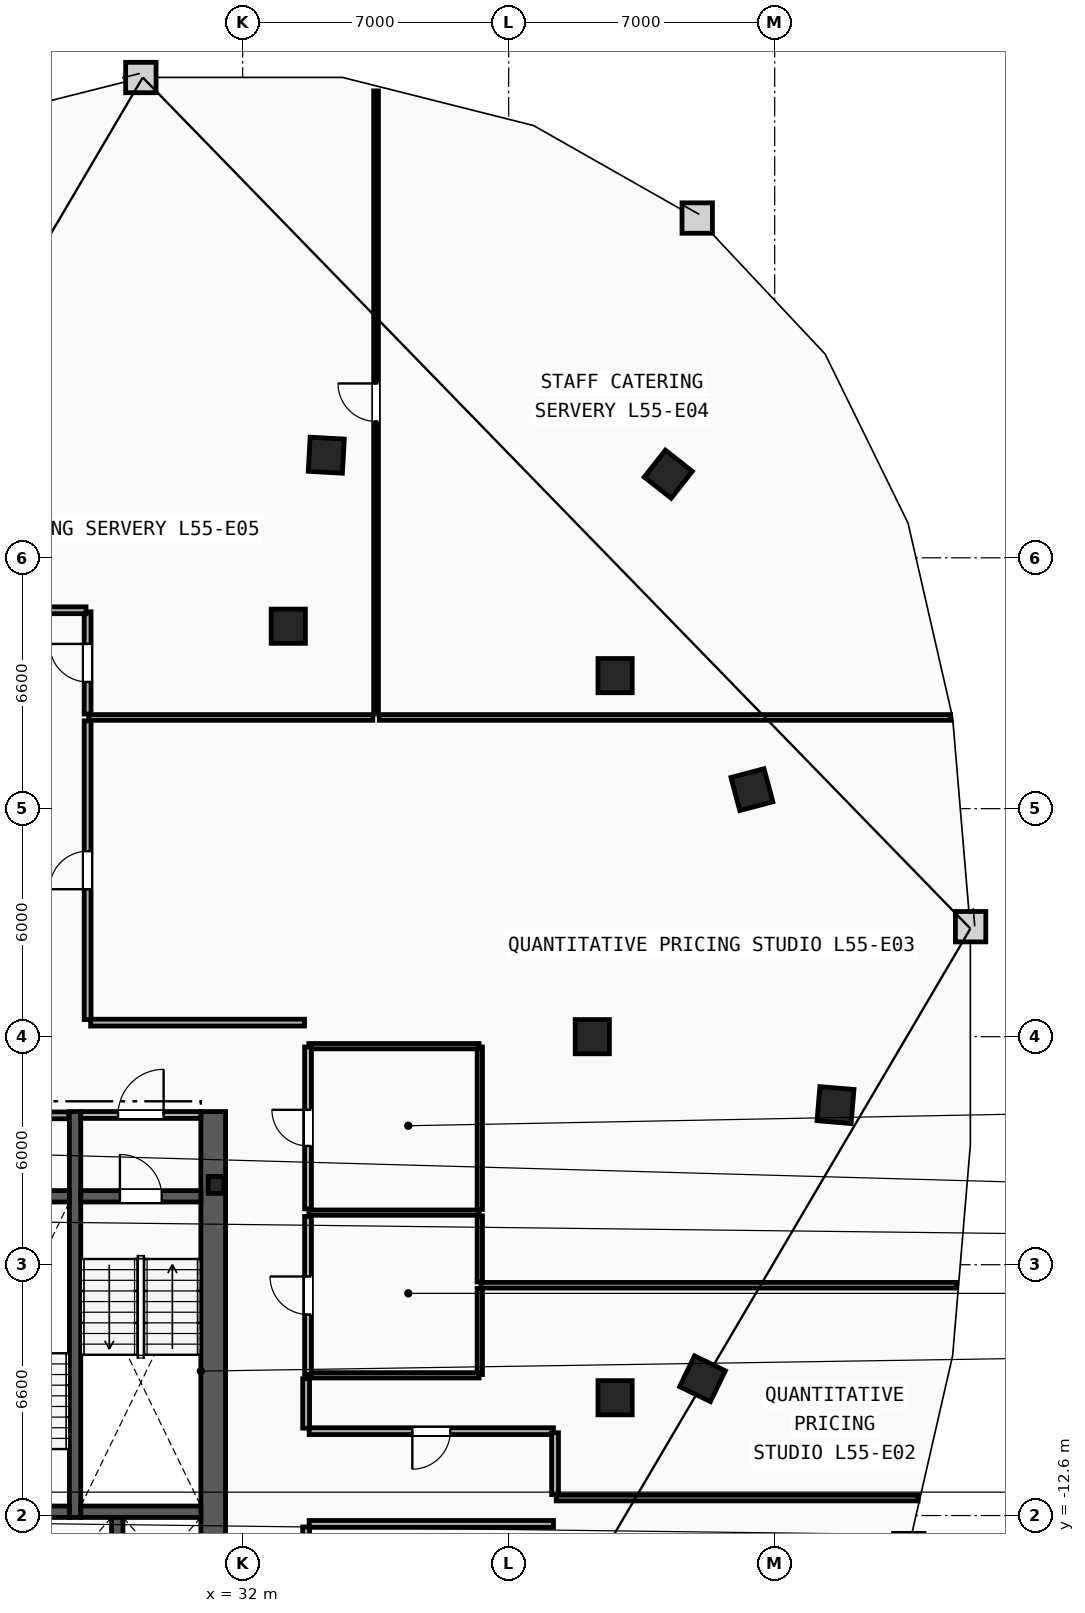
"""IFC4 building model, lengths in metres.
Left out: names, types, materials, properties, quantities, classifications, styles, units other than length and angle.
Written with IfcOpenShell. Run it as: python <this file> out.ifc"""

import sys

from ifc_helpers import new_model, si_unit, direction, frame, frame_2d, origin, origin_2d, place, context, subcontext, project, spatial, rectangle, i_section, extrude, element, fill, save


model = new_model("IFC4")
c1 = context("Model", 3, precision=1e-05, world=origin(), true_north=direction((0.0, 1.0)))
c2 = subcontext(c1, "Body", "Model", "MODEL_VIEW")
j1 = project(units=[si_unit("LENGTHUNIT", "METRE"), si_unit("PLANEANGLEUNIT", "RADIAN")], contexts=[c1])
p1 = place(None, origin())
s1 = spatial("IfcSite", under=j1, at=p1, CompositionType="ELEMENT")
p2 = place(p1, origin())
s2 = spatial("IfcBuilding", under=s1, at=p2, CompositionType="ELEMENT")
p3 = place(p2, frame((0.0, 0.0, 209.8)))
s3 = spatial("IfcBuildingStorey", under=s2, at=p3, CompositionType="ELEMENT", Elevation=209.8)
p4 = place(p3, frame((31.3, -3.9, 0.0), z_axis=(0.0, 0.0, 1.0), x_axis=(1.0, 0.0, 0.0)))
e1 = element("IfcColumn", 1, at=p4, inside=s3, PredefinedType="COLUMN", context=c2, shape_type="SweptSolid", body=[
    extrude(i_section(OverallWidth=0.416, OverallDepth=0.446, WebThickness=0.039, FlangeThickness=0.063, FilletRadius=0.018, at=origin_2d()), origin(), (0.0, 0.0, 1.0), 3.6),
])
for number, where, z_axis, x_axis in (
    (2, (41.2, 0.0, 0.0), (0.0, 0.0, 1.0), (1.0, 0.0, 0.0)),
    (3, (41.8, -9.5, 0.0), (0.0, 0.0, 1.0), (1.0, 0.0, 0.0)),
    (4, (41.8, 9.5, 0.0), (0.0, 0.0, 1.0), (1.0, 0.0, 0.0)),
    (5, (33.2, 10.8, 0.0), (0.0, 0.0, 1.0), (1.0, 0.0, 0.0)),
    (6, (44.1, -9.0, 0.0), (0.0, 0.0, 1.0), (0.437, 0.899, 0.0)),
    (7, (47.6, -1.8, 0.0), (0.0, 0.0, 1.0), (0.084, 0.997, 0.0)),
    (8, (45.4, 6.5, 0.0), (0.0, 0.0, 1.0), (-0.256, 0.967, 0.0)),
    (9, (43.2, 14.8, 0.0), (0.0, 0.0, 1.0), (-0.786, 0.618, 0.0)),
    (10, (34.2, 15.3, 0.0), (0.0, 0.0, 1.0), (-0.998, 0.055, 0.0)),
):
    element("IfcColumn", number, at=place(p3, frame(where, z_axis=z_axis, x_axis=x_axis)), inside=s3, PredefinedType="COLUMN", context=c2, shape_type="SweptSolid", body=[
        extrude(rectangle(XDim=0.9, YDim=0.9, at=origin_2d()), origin(), (0.0, 0.0, 1.0), 3.6),
    ])
p5 = place(p3, frame((31.225, -15.3, 0.0), z_axis=(0.0, 0.0, 1.0), x_axis=(0.0, 1.0, 0.0)))
e11 = element("IfcWall", 11, at=p5, inside=s3, PredefinedType="SHEAR", context=c2, shape_type="SweptSolid", body=[
    extrude(rectangle(XDim=13.33, YDim=0.65, at=frame_2d((6.665, 0.0))), origin(), (0.0, 0.0, 1.0), 3.34),
])
p6 = place(p3, frame((27.59, -12.65, 0.0), z_axis=(0.0, 0.0, 1.0), x_axis=(0.0, 1.0, 0.0)))
e12 = element("IfcWall", 12, at=p6, inside=s3, PredefinedType="SHEAR", context=c2, shape_type="SweptSolid", body=[
    extrude(rectangle(XDim=10.68, YDim=0.3, at=frame_2d((5.34, 0.0))), origin(), (0.0, 0.0, 1.0), 3.34),
])
p7 = place(p3, frame((27.74, -4.2, 0.0), z_axis=(0.0, 0.0, 1.0), x_axis=(1.0, 0.0, 0.0)))
e13 = element("IfcWall", 13, at=p7, inside=s3, PredefinedType="SHEAR", context=c2, shape_type="SweptSolid", body=[
    extrude(rectangle(XDim=3.16, YDim=0.3, at=frame_2d((1.58, 0.0))), origin(), (0.0, 0.0, 1.0), 3.34),
])
p8 = place(p7, frame((1.03, 0.0, 0.0)))
e14 = element("IfcOpeningElement", 14, at=p8, cuts=e13, PredefinedType="OPENING", context=c2, shape_type="SweptSolid", body=[
    extrude(rectangle(XDim=1.1, YDim=2.15, at=frame_2d((0.55, 1.075))), frame((0.0, 0.16, 0.0), z_axis=(0.0, -1.0, 0.0), x_axis=(1.0, 0.0, 0.0)), (0.0, 0.0, 1.0), 0.32),
])
p9 = place(p3, frame((27.74, -12.5, 0.0), z_axis=(0.0, 0.0, 1.0), x_axis=(1.0, 0.0, 0.0)))
e15 = element("IfcWall", 15, at=p9, inside=s3, PredefinedType="SHEAR", context=c2, shape_type="SweptSolid", body=[
    extrude(rectangle(XDim=3.16, YDim=0.3, at=frame_2d((1.58, 0.0))), origin(), (0.0, 0.0, 1.0), 3.34),
])
p10 = place(p3, frame((24.28, -12.5, 0.0), z_axis=(0.0, 0.0, 1.0), x_axis=(1.0, 0.0, 0.0)))
e16 = element("IfcWall", 16, at=p10, inside=s3, PredefinedType="SHEAR", context=c2, shape_type="SweptSolid", body=[
    extrude(rectangle(XDim=3.16, YDim=0.3, at=frame_2d((1.58, 0.0))), origin(), (0.0, 0.0, 1.0), 3.34),
])
p11 = place(p10, frame((1.03, 0.0, 0.0)))
e17 = element("IfcOpeningElement", 17, at=p11, cuts=e16, PredefinedType="OPENING", context=c2, shape_type="SweptSolid", body=[
    extrude(rectangle(XDim=1.1, YDim=2.15, at=frame_2d((0.55, 1.075))), frame((0.0, 0.16, 0.0), z_axis=(0.0, -1.0, 0.0), x_axis=(1.0, 0.0, 0.0)), (0.0, 0.0, 1.0), 0.32),
])
p12 = place(p3, frame((24.28, -4.2, 0.0), z_axis=(0.0, 0.0, 1.0), x_axis=(1.0, 0.0, 0.0)))
e18 = element("IfcWall", 18, at=p12, inside=s3, PredefinedType="SHEAR", context=c2, shape_type="SweptSolid", body=[
    extrude(rectangle(XDim=3.16, YDim=0.3, at=frame_2d((1.58, 0.0))), origin(), (0.0, 0.0, 1.0), 3.34),
])
p13 = place(p3, frame((27.74, -2.06, 0.0), z_axis=(0.0, 0.0, 1.0), x_axis=(1.0, 0.0, 0.0)))
e19 = element("IfcWall", 19, at=p13, inside=s3, PredefinedType="PARTITIONING", context=c2, shape_type="SweptSolid", body=[
    extrude(rectangle(XDim=3.16, YDim=0.18, at=frame_2d((1.58, 0.0))), origin(), (0.0, 0.0, 1.0), 3.34),
])
p14 = place(p13, frame((0.98, 0.0, 0.0)))
e20 = element("IfcOpeningElement", 20, at=p14, cuts=e19, PredefinedType="OPENING", context=c2, shape_type="SweptSolid", body=[
    extrude(rectangle(XDim=1.2, YDim=2.15, at=frame_2d((0.6, 1.075))), frame((0.0, 0.1, 0.0), z_axis=(0.0, -1.0, 0.0), x_axis=(1.0, 0.0, 0.0)), (0.0, 0.0, 1.0), 0.2),
])
p15 = place(p3, frame((28.7, -14.95, 0.0), z_axis=(0.0, 0.0, 1.0), x_axis=(0.0, 1.0, 0.0)))
e21 = element("IfcWall", 21, at=p15, inside=s3, PredefinedType="SHEAR", context=c2, shape_type="SweptSolid", body=[
    extrude(rectangle(XDim=2.3, YDim=0.3, at=frame_2d((1.15, 0.0))), origin(), (0.0, 0.0, 1.0), 3.34),
])
p16 = place(p3, frame((24.3, -2.07, 0.0), z_axis=(0.0, 0.0, 1.0), x_axis=(1.0, 0.0, 0.0)))
e22 = element("IfcWall", 22, at=p16, inside=s3, PredefinedType="PARTITIONING", context=c2, shape_type="SweptSolid", body=[
    extrude(rectangle(XDim=3.12, YDim=0.18, at=frame_2d((1.56, 0.0))), origin(), (0.0, 0.0, 1.0), 3.34),
])
p17 = place(p16, frame((1.085, 0.0, 0.0)))
e23 = element("IfcOpeningElement", 23, at=p17, cuts=e22, PredefinedType="OPENING", context=c2, shape_type="SweptSolid", body=[
    extrude(rectangle(XDim=0.95, YDim=2.1, at=frame_2d((0.475, 1.05))), frame((0.0, 0.1, 0.0), z_axis=(0.0, -1.0, 0.0), x_axis=(1.0, 0.0, 0.0)), (0.0, 0.0, 1.0), 0.2),
])
p18 = place(p3, frame((38.24, -8.89, 0.0), z_axis=(0.0, 0.0, 1.0), x_axis=(0.0, 1.0, 0.0)))
e24 = element("IfcWall", 24, at=p18, inside=s3, PredefinedType="PARTITIONING", context=c2, shape_type="SweptSolid", body=[
    extrude(rectangle(XDim=2.265, YDim=0.14, at=frame_2d((1.132, 0.0))), origin(), (0.0, 0.0, 1.0), 3.34),
])
p19 = place(p3, frame((38.24, -6.455, 0.0), z_axis=(0.0, 0.0, 1.0), x_axis=(0.0, 1.0, 0.0)))
e25 = element("IfcWall", 25, at=p19, inside=s3, PredefinedType="PARTITIONING", context=c2, shape_type="SweptSolid", body=[
    extrude(rectangle(XDim=1.74, YDim=0.14, at=frame_2d((0.87, 0.0))), origin(), (0.0, 0.0, 1.0), 3.34),
])
p20 = place(p3, frame((38.24, -4.545, 0.0), z_axis=(0.0, 0.0, 1.0), x_axis=(0.0, 1.0, 0.0)))
e26 = element("IfcWall", 26, at=p20, inside=s3, PredefinedType="PARTITIONING", context=c2, shape_type="SweptSolid", body=[
    extrude(rectangle(XDim=4.275, YDim=0.14, at=frame_2d((2.137, 0.0))), origin(), (0.0, 0.0, 1.0), 3.34),
])
for number, where, z_axis, x_axis in (
    (27, (33.74, -0.25, 0.0), (0.0, 0.0, 1.0), (1.0, 0.0, 0.0)),
    (28, (33.74, -4.63, 0.0), (0.0, 0.0, 1.0), (1.0, 0.0, 0.0)),
    (29, (33.74, -8.91, 0.0), (0.0, 0.0, 1.0), (1.0, 0.0, 0.0)),
):
    element("IfcWall", number, at=place(p3, frame(where, z_axis=z_axis, x_axis=x_axis)), inside=s3, PredefinedType="PARTITIONING", context=c2, shape_type="SweptSolid", body=[
        extrude(rectangle(XDim=4.48, YDim=0.14, at=frame_2d((2.24, 0.0))), origin(), (0.0, 0.0, 1.0), 3.34),
    ])
p21 = place(p3, frame((33.72, -4.53, 0.0), z_axis=(0.0, 0.0, 1.0), x_axis=(0.0, 1.0, 0.0)))
e30 = element("IfcWall", 30, at=p21, inside=s3, PredefinedType="PARTITIONING", context=c2, shape_type="SweptSolid", body=[
    extrude(rectangle(XDim=4.26, YDim=0.18, at=frame_2d((2.13, 0.0))), origin(), (0.0, 0.0, 1.0), 3.34),
])
p22 = place(p21, frame((1.655, 0.0, 0.0)))
e31 = element("IfcOpeningElement", 31, at=p22, cuts=e30, PredefinedType="OPENING", context=c2, shape_type="SweptSolid", body=[
    extrude(rectangle(XDim=0.95, YDim=2.1, at=frame_2d((0.475, 1.05))), frame((0.0, 0.1, 0.0), z_axis=(0.0, -1.0, 0.0), x_axis=(1.0, 0.0, 0.0)), (0.0, 0.0, 1.0), 0.2),
])
p23 = place(p3, frame((33.72, -8.89, 0.0), z_axis=(0.0, 0.0, 1.0), x_axis=(0.0, 1.0, 0.0)))
e32 = element("IfcWall", 32, at=p23, inside=s3, PredefinedType="PARTITIONING", context=c2, shape_type="SweptSolid", body=[
    extrude(rectangle(XDim=4.16, YDim=0.18, at=frame_2d((2.08, 0.0))), origin(), (0.0, 0.0, 1.0), 3.34),
])
p24 = place(p23, frame((1.58, 0.0, 0.0)))
e33 = element("IfcOpeningElement", 33, at=p24, cuts=e32, PredefinedType="OPENING", context=c2, shape_type="SweptSolid", body=[
    extrude(rectangle(XDim=1.0, YDim=2.15, at=frame_2d((0.5, 1.075))), frame((0.0, 0.1, 0.0), z_axis=(0.0, -1.0, 0.0), x_axis=(1.0, 0.0, 0.0)), (0.0, 0.0, 1.0), 0.2),
])
p25 = place(p3, frame((27.95, 8.4, 0.0), z_axis=(0.0, 0.0, 1.0), x_axis=(1.0, 0.0, 0.0)))
e34 = element("IfcWall", 34, at=p25, inside=s3, PredefinedType="PARTITIONING", context=c2, shape_type="SweptSolid", body=[
    extrude(rectangle(XDim=7.475, YDim=0.15, at=frame_2d((3.738, 0.0))), origin(), (0.0, 0.0, 1.0), 3.34),
])
p26 = place(p3, frame((35.595, 8.4, 0.0), z_axis=(0.0, 0.0, 1.0), x_axis=(1.0, 0.0, 0.0)))
e35 = element("IfcWall", 35, at=p26, inside=s3, PredefinedType="PARTITIONING", context=c2, shape_type="SweptSolid", body=[
    extrude(rectangle(XDim=15.035, YDim=0.15, at=frame_2d((7.517, 0.0))), origin(), (0.0, 0.0, 1.0), 3.34),
])
p27 = place(p3, frame((38.27, -6.54, 0.0), z_axis=(0.0, 0.0, 1.0), x_axis=(1.0, 0.0, 0.0)))
e36 = element("IfcWall", 36, at=p27, inside=s3, PredefinedType="PARTITIONING", context=c2, shape_type="SweptSolid", body=[
    extrude(rectangle(XDim=12.518, YDim=0.15, at=frame_2d((6.259, 0.0))), origin(), (0.0, 0.0, 1.0), 3.34),
])
p28 = place(p3, frame((40.25, -12.14, 0.0), z_axis=(0.0, 0.0, 1.0), x_axis=(1.0, 0.0, 0.0)))
e37 = element("IfcWall", 37, at=p28, inside=s3, PredefinedType="PARTITIONING", context=c2, shape_type="SweptSolid", body=[
    extrude(rectangle(XDim=9.523, YDim=0.15, at=frame_2d((4.761, 0.0))), origin(), (0.0, 0.0, 1.0), 3.34),
])
p29 = place(p3, frame((33.75, -12.82, 0.0), z_axis=(0.0, 0.0, 1.0), x_axis=(1.0, 0.0, 0.0)))
e38 = element("IfcWall", 38, at=p29, inside=s3, PredefinedType="PARTITIONING", context=c2, shape_type="SweptSolid", body=[
    extrude(rectangle(XDim=6.428, YDim=0.18, at=frame_2d((3.214, 0.0))), origin(), (0.0, 0.0, 1.0), 3.34),
])
p30 = place(p3, frame((33.67, -17.428, 0.0), z_axis=(0.0, 0.0, 1.0), x_axis=(0.0, 1.0, 0.0)))
e39 = element("IfcWall", 39, at=p30, inside=s3, PredefinedType="PARTITIONING", context=c2, shape_type="SweptSolid", body=[
    extrude(rectangle(XDim=4.529, YDim=0.18, at=frame_2d((2.264, 0.0))), origin(), (0.0, 0.0, 1.0), 3.34),
])
p31 = place(p3, frame((40.178, -10.38, 0.0), z_axis=(0.0, 0.0, 1.0), x_axis=(-1.0, 0.0, 0.0)))
e40 = element("IfcWall", 40, at=p31, inside=s3, PredefinedType="PARTITIONING", context=c2, shape_type="SweptSolid", body=[
    extrude(rectangle(XDim=6.428, YDim=0.18, at=frame_2d((3.214, 0.0))), origin(), (0.0, 0.0, 1.0), 3.34),
])
p32 = place(p31, frame((2.714, 0.0, 0.0)))
e41 = element("IfcOpeningElement", 41, at=p32, cuts=e40, PredefinedType="OPENING", context=c2, shape_type="SweptSolid", body=[
    extrude(rectangle(XDim=1.0, YDim=2.15, at=frame_2d((0.5, 1.075))), frame((0.0, 0.1, 0.0), z_axis=(0.0, -1.0, 0.0), x_axis=(1.0, 0.0, 0.0)), (0.0, 0.0, 1.0), 0.2),
])
p33 = place(p3, frame((40.22, -12.05, 0.0), z_axis=(0.0, 0.0, 1.0), x_axis=(0.0, 1.0, 0.0)))
e42 = element("IfcWall", 42, at=p33, inside=s3, PredefinedType="PARTITIONING", context=c2, shape_type="SweptSolid", body=[
    extrude(rectangle(XDim=1.629, YDim=0.18, at=frame_2d((0.814, 0.0))), origin(), (0.0, 0.0, 1.0), 3.34),
])
p34 = place(p3, frame((33.67, -10.3, 0.0), z_axis=(0.0, 0.0, 1.0), x_axis=(0.0, 1.0, 0.0)))
e43 = element("IfcWall", 43, at=p34, inside=s3, PredefinedType="PARTITIONING", context=c2, shape_type="SweptSolid", body=[
    extrude(rectangle(XDim=1.299, YDim=0.18, at=frame_2d((0.649, 0.0))), origin(), (0.0, 0.0, 1.0), 3.34),
])
p35 = place(p3, frame((27.92, 0.45, 0.0), z_axis=(0.0, 0.0, 1.0), x_axis=(0.0, 1.0, 0.0)))
e44 = element("IfcWall", 44, at=p35, inside=s3, PredefinedType="PARTITIONING", context=c2, shape_type="SweptSolid", body=[
    extrude(rectangle(XDim=7.86, YDim=0.18, at=frame_2d((3.93, 0.0))), origin(), (0.0, 0.0, 1.0), 3.34),
])
p36 = place(p35, frame((3.43, 0.0, 0.0)))
e45 = element("IfcOpeningElement", 45, at=p36, cuts=e44, PredefinedType="OPENING", context=c2, shape_type="SweptSolid", body=[
    extrude(rectangle(XDim=1.0, YDim=2.15, at=frame_2d((0.5, 1.075))), frame((0.0, 0.1, 0.0), z_axis=(0.0, -1.0, 0.0), x_axis=(1.0, 0.0, 0.0)), (0.0, 0.0, 1.0), 0.2),
])
p37 = place(p3, frame((33.628, 0.37, 0.0), z_axis=(0.0, 0.0, 1.0), x_axis=(-1.0, 0.0, 0.0)))
e46 = element("IfcWall", 46, at=p37, inside=s3, PredefinedType="PARTITIONING", context=c2, shape_type="SweptSolid", body=[
    extrude(rectangle(XDim=5.628, YDim=0.18, at=frame_2d((2.814, 0.0))), origin(), (0.0, 0.0, 1.0), 3.34),
])
p38 = place(p3, frame((27.92, 8.49, 0.0), z_axis=(0.0, 0.0, 1.0), x_axis=(0.0, 1.0, 0.0)))
e47 = element("IfcWall", 47, at=p38, inside=s3, PredefinedType="PARTITIONING", context=c2, shape_type="SweptSolid", body=[
    extrude(rectangle(XDim=2.688, YDim=0.18, at=frame_2d((1.344, 0.0))), origin(), (0.0, 0.0, 1.0), 3.34),
])
p39 = place(p38, frame((0.844, 0.0, 0.0)))
e48 = element("IfcOpeningElement", 48, at=p39, cuts=e47, PredefinedType="OPENING", context=c2, shape_type="SweptSolid", body=[
    extrude(rectangle(XDim=1.0, YDim=2.15, at=frame_2d((0.5, 1.075))), frame((0.0, 0.1, 0.0), z_axis=(0.0, -1.0, 0.0), x_axis=(1.0, 0.0, 0.0)), (0.0, 0.0, 1.0), 0.2),
])
p40 = place(p3, frame((27.878, 11.22, 0.0), z_axis=(0.0, 0.0, 1.0), x_axis=(-1.0, 0.0, 0.0)))
e49 = element("IfcWall", 49, at=p40, inside=s3, PredefinedType="PARTITIONING", context=c2, shape_type="SweptSolid", body=[
    extrude(rectangle(XDim=2.357, YDim=0.18, at=frame_2d((1.178, 0.0))), origin(), (0.0, 0.0, 1.0), 3.34),
])
p41 = place(p3, frame((35.51, 8.49, 0.0), z_axis=(0.0, 0.0, 1.0), x_axis=(0.0, 1.0, 0.0)))
e50 = element("IfcWall", 50, at=p41, inside=s3, PredefinedType="PARTITIONING", context=c2, shape_type="SweptSolid", body=[
    extrude(rectangle(XDim=16.396, YDim=0.125, at=frame_2d((8.198, 0.0))), origin(), (0.0, 0.0, 1.0), 3.34),
])
p42 = place(p41, frame((7.698, 0.0, 0.0)))
e51 = element("IfcOpeningElement", 51, at=p42, cuts=e50, PredefinedType="OPENING", context=c2, shape_type="SweptSolid", body=[
    extrude(rectangle(XDim=1.0, YDim=2.15, at=frame_2d((0.5, 1.075))), frame((0.0, 0.073, 0.0), z_axis=(0.0, -1.0, 0.0), x_axis=(1.0, 0.0, 0.0)), (0.0, 0.0, 1.0), 0.145),
])
p43 = place(p8, origin())
e52 = element("IfcDoor", 52, at=p43, inside=s3, OperationType="SINGLE_SWING_LEFT", PredefinedType="DOOR", context=c2, shape_type="SweptSolid", body=[
    extrude(rectangle(XDim=1.1, YDim=2.15, at=frame_2d((0.55, 1.075))), frame((0.0, 0.025, 0.0), z_axis=(0.0, -1.0, 0.0), x_axis=(1.0, 0.0, 0.0)), (0.0, 0.0, 1.0), 0.05),
])
fill(e14, e52)
p44 = place(p14, origin())
e53 = element("IfcDoor", 53, at=p44, inside=s3, OperationType="SINGLE_SWING_RIGHT", PredefinedType="DOOR", context=c2, shape_type="SweptSolid", body=[
    extrude(rectangle(XDim=1.2, YDim=2.15, at=frame_2d((0.6, 1.075))), frame((0.0, 0.025, 0.0), z_axis=(0.0, -1.0, 0.0), x_axis=(1.0, 0.0, 0.0)), (0.0, 0.0, 1.0), 0.05),
])
fill(e20, e53)
p45 = place(p42, origin())
e54 = element("IfcDoor", 54, at=p45, inside=s3, OperationType="SINGLE_SWING_RIGHT", PredefinedType="DOOR", context=c2, shape_type="SweptSolid", body=[
    extrude(rectangle(XDim=1.0, YDim=2.15, at=frame_2d((0.5, 1.075))), frame((0.0, 0.025, 0.0), z_axis=(0.0, -1.0, 0.0), x_axis=(1.0, 0.0, 0.0)), (0.0, 0.0, 1.0), 0.05),
])
fill(e51, e54)
p46 = place(p36, origin())
e55 = element("IfcDoor", 55, at=p46, inside=s3, OperationType="SINGLE_SWING_LEFT", PredefinedType="DOOR", context=c2, shape_type="SweptSolid", body=[
    extrude(rectangle(XDim=1.0, YDim=2.15, at=frame_2d((0.5, 1.075))), frame((0.0, 0.025, 0.0), z_axis=(0.0, -1.0, 0.0), x_axis=(1.0, 0.0, 0.0)), (0.0, 0.0, 1.0), 0.05),
])
fill(e45, e55)
p47 = place(p32, origin())
e56 = element("IfcDoor", 56, at=p47, inside=s3, OperationType="SINGLE_SWING_RIGHT", PredefinedType="DOOR", context=c2, shape_type="SweptSolid", body=[
    extrude(rectangle(XDim=1.0, YDim=2.15, at=frame_2d((0.5, 1.075))), frame((0.0, 0.025, 0.0), z_axis=(0.0, -1.0, 0.0), x_axis=(1.0, 0.0, 0.0)), (0.0, 0.0, 1.0), 0.05),
])
fill(e41, e56)
p48 = place(p22, origin())
e57 = element("IfcDoor", 57, at=p48, inside=s3, OperationType="SINGLE_SWING_RIGHT", PredefinedType="DOOR", context=c2, shape_type="SweptSolid", body=[
    extrude(rectangle(XDim=0.95, YDim=2.1, at=frame_2d((0.475, 1.05))), frame((0.0, 0.025, 0.0), z_axis=(0.0, -1.0, 0.0), x_axis=(1.0, 0.0, 0.0)), (0.0, 0.0, 1.0), 0.05),
])
fill(e31, e57)
p49 = place(p24, origin())
e58 = element("IfcDoor", 58, at=p49, inside=s3, OperationType="SINGLE_SWING_RIGHT", PredefinedType="DOOR", context=c2, shape_type="SweptSolid", body=[
    extrude(rectangle(XDim=1.0, YDim=2.15, at=frame_2d((0.5, 1.075))), frame((0.0, 0.025, 0.0), z_axis=(0.0, -1.0, 0.0), x_axis=(1.0, 0.0, 0.0)), (0.0, 0.0, 1.0), 0.05),
])
fill(e33, e58)
p50 = place(p39, origin())
e59 = element("IfcDoor", 59, at=p50, inside=s3, OperationType="SINGLE_SWING_RIGHT", PredefinedType="DOOR", context=c2, shape_type="SweptSolid", body=[
    extrude(rectangle(XDim=1.0, YDim=2.15, at=frame_2d((0.5, 1.075))), frame((0.0, 0.025, 0.0), z_axis=(0.0, -1.0, 0.0), x_axis=(1.0, 0.0, 0.0)), (0.0, 0.0, 1.0), 0.05),
])
fill(e48, e59)
save(model, sys.argv[1])
